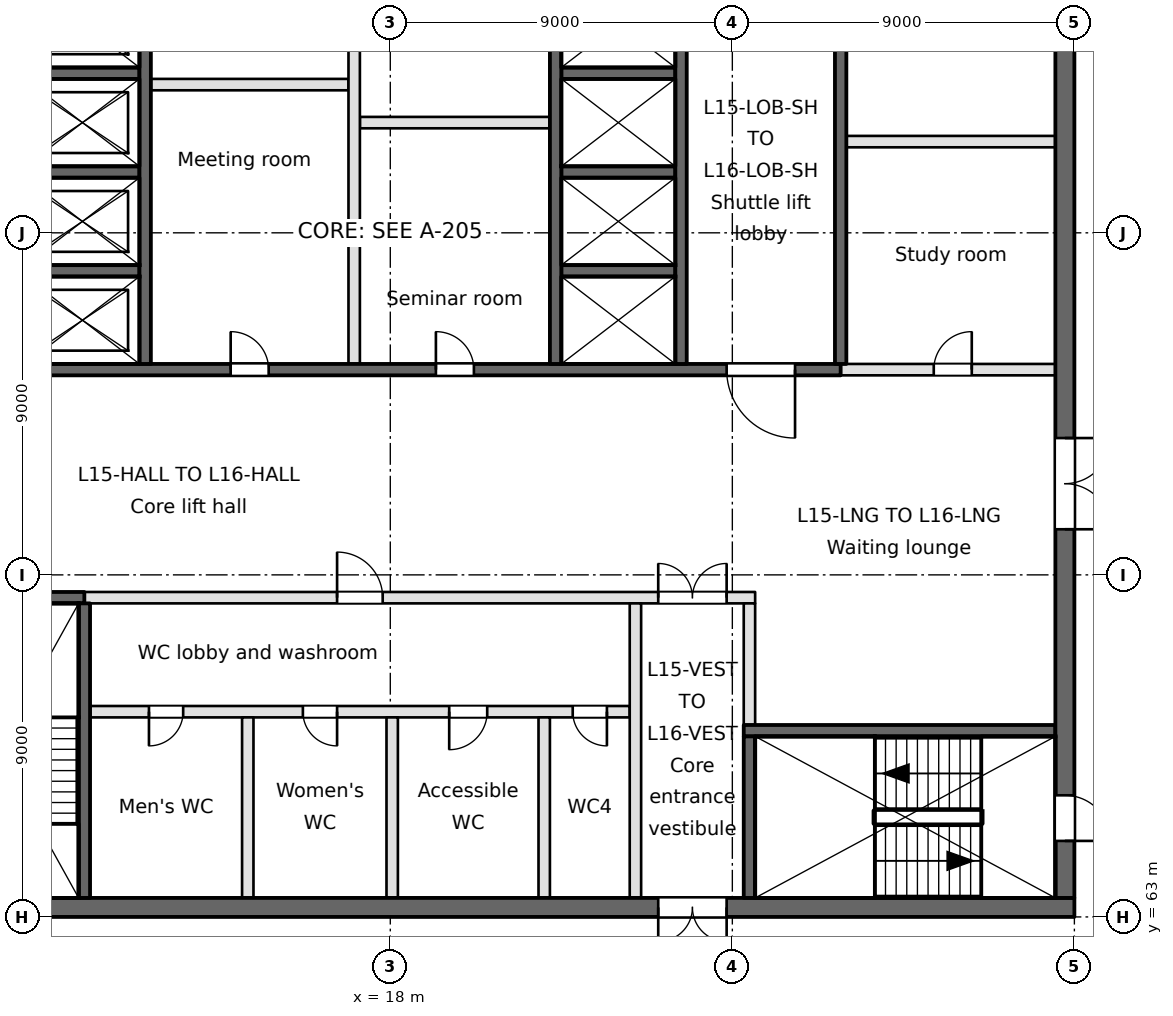
"""IFC4 building model, lengths in metres.
Left out: names, types, materials, properties, quantities, classifications, styles, units other than length and angle.
Written with IfcOpenShell. Run it as: python <this file> out.ifc"""

import sys

from ifc_helpers import new_model, si_unit, direction, frame, frame_2d, origin, place, context, subcontext, project, spatial, rectangle, extrude, element, fill, save


model = new_model("IFC4")
c1 = context("Model", 3, precision=1e-05, world=origin(), true_north=direction((0.0, 1.0)))
c2 = subcontext(c1, "Body", "Model", "MODEL_VIEW")
j1 = project(units=[si_unit("LENGTHUNIT", "METRE"), si_unit("PLANEANGLEUNIT", "RADIAN")], contexts=[c1])
p1 = place(None, origin())
s1 = spatial("IfcSite", under=j1, at=p1, CompositionType="ELEMENT")
p2 = place(p1, origin())
s2 = spatial("IfcBuilding", under=s1, at=p2, CompositionType="ELEMENT")
p3 = place(p2, frame((0.0, 0.0, 65.4)))
s3 = spatial("IfcBuildingStorey", under=s2, at=p3, CompositionType="ELEMENT", Elevation=65.4)
p4 = place(p3, frame((0.9, 63.25, -0.4), z_axis=(0.0, 0.0, 1.0), x_axis=(1.0, 0.0, 0.0)))
e1 = element("IfcWall", 1, at=p4, inside=s3, PredefinedType="SOLIDWALL", context=c2, shape_type="SweptSolid", body=[
    extrude(rectangle(XDim=35.1, YDim=0.5, at=frame_2d((17.55, 0.0))), origin(), (0.0, 0.0, 1.0), 3.7),
])
p5 = place(p4, frame((24.15, 0.0, 0.4)))
e2 = element("IfcOpeningElement", 2, at=p5, cuts=e1, PredefinedType="OPENING", context=c2, shape_type="SweptSolid", body=[
    extrude(rectangle(XDim=1.8, YDim=2.1, at=frame_2d((0.9, 1.05))), frame((0.0, 0.25, 0.0), z_axis=(0.0, -1.0, 0.0), x_axis=(1.0, 0.0, 0.0)), (0.0, 0.0, 1.0), 0.5),
])
p6 = place(p4, frame((1.55, 0.0, 0.4)))
e3 = element("IfcOpeningElement", 3, at=p6, cuts=e1, PredefinedType="OPENING", context=c2, shape_type="SweptSolid", body=[
    extrude(rectangle(XDim=1.2, YDim=2.1, at=frame_2d((0.6, 1.05))), frame((0.0, 0.25, 0.0), z_axis=(0.0, -1.0, 0.0), x_axis=(1.0, 0.0, 0.0)), (0.0, 0.0, 1.0), 0.5),
])
p7 = place(p4, frame((6.15, 0.0, 0.4)))
e4 = element("IfcOpeningElement", 4, at=p7, cuts=e1, PredefinedType="OPENING", context=c2, shape_type="SweptSolid", body=[
    extrude(rectangle(XDim=1.2, YDim=2.1, at=frame_2d((0.6, 1.05))), frame((0.0, 0.25, 0.0), z_axis=(0.0, -1.0, 0.0), x_axis=(1.0, 0.0, 0.0)), (0.0, 0.0, 1.0), 0.5),
])
p8 = place(p3, frame((27.3, 67.9, -0.4), z_axis=(0.0, 0.0, 1.0), x_axis=(1.0, 0.0, 0.0)))
e5 = element("IfcWall", 5, at=p8, inside=s3, PredefinedType="SOLIDWALL", context=c2, shape_type="SweptSolid", body=[
    extrude(rectangle(XDim=8.2, YDim=0.3, at=frame_2d((4.1, 0.0))), origin(), (0.0, 0.0, 1.0), 3.7),
])
p9 = place(p3, frame((10.1, 68.4, 0.0), z_axis=(0.0, 0.0, 1.0), x_axis=(1.0, 0.0, 0.0)))
e6 = element("IfcWall", 6, at=p9, inside=s3, PredefinedType="PARTITIONING", context=c2, shape_type="SweptSolid", body=[
    extrude(rectangle(XDim=14.2, YDim=0.3, at=frame_2d((7.1, 0.0))), origin(), (0.0, 0.0, 1.0), 3.3),
])
p10 = place(p9, frame((1.55, 0.0, 0.0)))
e7 = element("IfcOpeningElement", 7, at=p10, cuts=e6, PredefinedType="OPENING", context=c2, shape_type="SweptSolid", body=[
    extrude(rectangle(XDim=0.9, YDim=2.1, at=frame_2d((0.45, 1.05))), frame((0.0, 0.15, 0.0), z_axis=(0.0, -1.0, 0.0), x_axis=(1.0, 0.0, 0.0)), (0.0, 0.0, 1.0), 0.3),
])
p11 = place(p9, frame((5.6, 0.0, 0.0)))
e8 = element("IfcOpeningElement", 8, at=p11, cuts=e6, PredefinedType="OPENING", context=c2, shape_type="SweptSolid", body=[
    extrude(rectangle(XDim=0.9, YDim=2.1, at=frame_2d((0.45, 1.05))), frame((0.0, 0.15, 0.0), z_axis=(0.0, -1.0, 0.0), x_axis=(1.0, 0.0, 0.0)), (0.0, 0.0, 1.0), 0.3),
])
p12 = place(p9, frame((9.45, 0.0, 0.0)))
e9 = element("IfcOpeningElement", 9, at=p12, cuts=e6, PredefinedType="OPENING", context=c2, shape_type="SweptSolid", body=[
    extrude(rectangle(XDim=1.0, YDim=2.1, at=frame_2d((0.5, 1.05))), frame((0.0, 0.15, 0.0), z_axis=(0.0, -1.0, 0.0), x_axis=(1.0, 0.0, 0.0)), (0.0, 0.0, 1.0), 0.3),
])
p13 = place(p9, frame((12.7, 0.0, 0.0)))
e10 = element("IfcOpeningElement", 10, at=p13, cuts=e6, PredefinedType="OPENING", context=c2, shape_type="SweptSolid", body=[
    extrude(rectangle(XDim=0.9, YDim=2.1, at=frame_2d((0.45, 1.05))), frame((0.0, 0.15, 0.0), z_axis=(0.0, -1.0, 0.0), x_axis=(1.0, 0.0, 0.0)), (0.0, 0.0, 1.0), 0.3),
])
p14 = place(p3, frame((0.9, 71.4, -0.4), z_axis=(0.0, 0.0, 1.0), x_axis=(1.0, 0.0, 0.0)))
e11 = element("IfcWall", 11, at=p14, inside=s3, PredefinedType="SOLIDWALL", context=c2, shape_type="SweptSolid", body=[
    extrude(rectangle(XDim=9.05, YDim=0.3, at=frame_2d((4.525, 0.0))), origin(), (0.0, 0.0, 1.0), 3.7),
])
p15 = place(p3, frame((9.95, 71.4, 0.0), z_axis=(0.0, 0.0, 1.0), x_axis=(1.0, 0.0, 0.0)))
e12 = element("IfcWall", 12, at=p15, inside=s3, PredefinedType="PARTITIONING", context=c2, shape_type="SweptSolid", body=[
    extrude(rectangle(XDim=17.65, YDim=0.3, at=frame_2d((8.825, 0.0))), origin(), (0.0, 0.0, 1.0), 3.3),
])
p16 = place(p15, frame((15.1, 0.0, 0.0)))
e13 = element("IfcOpeningElement", 13, at=p16, cuts=e12, PredefinedType="OPENING", context=c2, shape_type="SweptSolid", body=[
    extrude(rectangle(XDim=1.8, YDim=2.1, at=frame_2d((0.9, 1.05))), frame((0.0, 0.15, 0.0), z_axis=(0.0, -1.0, 0.0), x_axis=(1.0, 0.0, 0.0)), (0.0, 0.0, 1.0), 0.3),
])
p17 = place(p15, frame((6.65, 0.0, 0.0)))
e14 = element("IfcOpeningElement", 14, at=p17, cuts=e12, PredefinedType="OPENING", context=c2, shape_type="SweptSolid", body=[
    extrude(rectangle(XDim=1.2, YDim=2.1, at=frame_2d((0.6, 1.05))), frame((0.0, 0.15, 0.0), z_axis=(0.0, -1.0, 0.0), x_axis=(1.0, 0.0, 0.0)), (0.0, 0.0, 1.0), 0.3),
])
p18 = place(p3, frame((0.9, 77.4, -0.4), z_axis=(0.0, 0.0, 1.0), x_axis=(1.0, 0.0, 0.0)))
e15 = element("IfcWall", 15, at=p18, inside=s3, PredefinedType="SOLIDWALL", context=c2, shape_type="SweptSolid", body=[
    extrude(rectangle(XDim=28.95, YDim=0.3, at=frame_2d((14.475, 0.0))), origin(), (0.0, 0.0, 1.0), 3.7),
])
p19 = place(p18, frame((4.35, 0.0, 0.4)))
e16 = element("IfcOpeningElement", 16, at=p19, cuts=e15, PredefinedType="OPENING", context=c2, shape_type="SweptSolid", body=[
    extrude(rectangle(XDim=1.8, YDim=2.1, at=frame_2d((0.9, 1.05))), frame((0.0, 0.15, 0.0), z_axis=(0.0, -1.0, 0.0), x_axis=(1.0, 0.0, 0.0)), (0.0, 0.0, 1.0), 0.3),
])
p20 = place(p18, frame((25.95, 0.0, 0.4)))
e17 = element("IfcOpeningElement", 17, at=p20, cuts=e15, PredefinedType="OPENING", context=c2, shape_type="SweptSolid", body=[
    extrude(rectangle(XDim=1.8, YDim=2.1, at=frame_2d((0.9, 1.05))), frame((0.0, 0.15, 0.0), z_axis=(0.0, -1.0, 0.0), x_axis=(1.0, 0.0, 0.0)), (0.0, 0.0, 1.0), 0.3),
])
p21 = place(p18, frame((12.9, 0.0, 0.4)))
e18 = element("IfcOpeningElement", 18, at=p21, cuts=e15, PredefinedType="OPENING", context=c2, shape_type="SweptSolid", body=[
    extrude(rectangle(XDim=1.0, YDim=2.1, at=frame_2d((0.5, 1.05))), frame((0.0, 0.15, 0.0), z_axis=(0.0, -1.0, 0.0), x_axis=(1.0, 0.0, 0.0)), (0.0, 0.0, 1.0), 0.3),
])
p22 = place(p18, frame((18.3, 0.0, 0.4)))
e19 = element("IfcOpeningElement", 19, at=p22, cuts=e15, PredefinedType="OPENING", context=c2, shape_type="SweptSolid", body=[
    extrude(rectangle(XDim=1.0, YDim=2.1, at=frame_2d((0.5, 1.05))), frame((0.0, 0.15, 0.0), z_axis=(0.0, -1.0, 0.0), x_axis=(1.0, 0.0, 0.0)), (0.0, 0.0, 1.0), 0.3),
])
p23 = place(p3, frame((29.85, 77.4, 0.0), z_axis=(0.0, 0.0, 1.0), x_axis=(1.0, 0.0, 0.0)))
e20 = element("IfcWall", 20, at=p23, inside=s3, PredefinedType="PARTITIONING", context=c2, shape_type="SweptSolid", body=[
    extrude(rectangle(XDim=5.65, YDim=0.3, at=frame_2d((2.825, 0.0))), origin(), (0.0, 0.0, 1.0), 3.3),
])
p24 = place(p23, frame((2.45, 0.0, 0.0)))
e21 = element("IfcOpeningElement", 21, at=p24, cuts=e20, PredefinedType="OPENING", context=c2, shape_type="SweptSolid", body=[
    extrude(rectangle(XDim=1.0, YDim=2.1, at=frame_2d((0.5, 1.05))), frame((0.0, 0.15, 0.0), z_axis=(0.0, -1.0, 0.0), x_axis=(1.0, 0.0, 0.0)), (0.0, 0.0, 1.0), 0.3),
])
for number, where, z_axis, x_axis in (
    (22, (8.4, 80.0, -0.4), (0.0, 0.0, 1.0), (1.0, 0.0, 0.0)),
    (23, (22.5, 80.0, -0.4), (0.0, 0.0, 1.0), (1.0, 0.0, 0.0)),
    (24, (8.4, 82.6, -0.4), (0.0, 0.0, 1.0), (1.0, 0.0, 0.0)),
    (25, (22.5, 82.6, -0.4), (0.0, 0.0, 1.0), (1.0, 0.0, 0.0)),
):
    element("IfcWall", number, at=place(p3, frame(where, z_axis=z_axis, x_axis=x_axis)), inside=s3, PredefinedType="SOLIDWALL", context=c2, shape_type="SweptSolid", body=[
        extrude(rectangle(XDim=3.0, YDim=0.3, at=frame_2d((1.5, 0.0))), origin(), (0.0, 0.0, 1.0), 3.7),
    ])
p25 = place(p3, frame((30.0, 83.4, 0.0), z_axis=(0.0, 0.0, 1.0), x_axis=(1.0, 0.0, 0.0)))
e26 = element("IfcWall", 26, at=p25, inside=s3, PredefinedType="PARTITIONING", context=c2, shape_type="SweptSolid", body=[
    extrude(rectangle(XDim=5.5, YDim=0.3, at=frame_2d((2.75, 0.0))), origin(), (0.0, 0.0, 1.0), 3.3),
])
p26 = place(p3, frame((17.2, 83.9, 0.0), z_axis=(0.0, 0.0, 1.0), x_axis=(1.0, 0.0, 0.0)))
e27 = element("IfcWall", 27, at=p26, inside=s3, PredefinedType="PARTITIONING", context=c2, shape_type="SweptSolid", body=[
    extrude(rectangle(XDim=5.0, YDim=0.3, at=frame_2d((2.5, 0.0))), origin(), (0.0, 0.0, 1.0), 3.3),
])
p27 = place(p3, frame((11.7, 84.9, 0.0), z_axis=(0.0, 0.0, 1.0), x_axis=(1.0, 0.0, 0.0)))
e28 = element("IfcWall", 28, at=p27, inside=s3, PredefinedType="PARTITIONING", context=c2, shape_type="SweptSolid", body=[
    extrude(rectangle(XDim=5.2, YDim=0.3, at=frame_2d((2.6, 0.0))), origin(), (0.0, 0.0, 1.0), 3.3),
])
for number, where, z_axis, x_axis in (
    (29, (8.4, 85.2, -0.4), (0.0, 0.0, 1.0), (1.0, 0.0, 0.0)),
    (30, (22.5, 85.2, -0.4), (0.0, 0.0, 1.0), (1.0, 0.0, 0.0)),
):
    element("IfcWall", number, at=place(p3, frame(where, z_axis=z_axis, x_axis=x_axis)), inside=s3, PredefinedType="SOLIDWALL", context=c2, shape_type="SweptSolid", body=[
        extrude(rectangle(XDim=3.0, YDim=0.3, at=frame_2d((1.5, 0.0))), origin(), (0.0, 0.0, 1.0), 3.7),
    ])
p28 = place(p3, frame((9.95, 63.5, -0.4), z_axis=(0.0, 0.0, 1.0), x_axis=(0.0, 1.0, 0.0)))
e31 = element("IfcWall", 31, at=p28, inside=s3, PredefinedType="SOLIDWALL", context=c2, shape_type="SweptSolid", body=[
    extrude(rectangle(XDim=7.75, YDim=0.3, at=frame_2d((3.875, 0.0))), origin(), (0.0, 0.0, 1.0), 3.7),
])
p29 = place(p3, frame((11.55, 77.55, -0.4), z_axis=(0.0, 0.0, 1.0), x_axis=(0.0, 1.0, 0.0)))
e32 = element("IfcWall", 32, at=p29, inside=s3, PredefinedType="SOLIDWALL", context=c2, shape_type="SweptSolid", body=[
    extrude(rectangle(XDim=10.1, YDim=0.3, at=frame_2d((5.05, 0.0))), origin(), (0.0, 0.0, 1.0), 3.7),
])
p30 = place(p3, frame((14.25, 63.5, 0.0), z_axis=(0.0, 0.0, 1.0), x_axis=(0.0, 1.0, 0.0)))
e33 = element("IfcWall", 33, at=p30, inside=s3, PredefinedType="PARTITIONING", context=c2, shape_type="SweptSolid", body=[
    extrude(rectangle(XDim=4.75, YDim=0.3, at=frame_2d((2.375, 0.0))), origin(), (0.0, 0.0, 1.0), 3.3),
])
p31 = place(p3, frame((17.05, 77.55, 0.0), z_axis=(0.0, 0.0, 1.0), x_axis=(0.0, 1.0, 0.0)))
e34 = element("IfcWall", 34, at=p31, inside=s3, PredefinedType="PARTITIONING", context=c2, shape_type="SweptSolid", body=[
    extrude(rectangle(XDim=12.95, YDim=0.3, at=frame_2d((6.475, 0.0))), origin(), (0.0, 0.0, 1.0), 3.3),
])
for number, where, z_axis, x_axis in (
    (35, (18.05, 63.5, 0.0), (0.0, 0.0, 1.0), (0.0, 1.0, 0.0)),
    (36, (22.05, 63.5, 0.0), (0.0, 0.0, 1.0), (0.0, 1.0, 0.0)),
):
    element("IfcWall", number, at=place(p3, frame(where, z_axis=z_axis, x_axis=x_axis)), inside=s3, PredefinedType="PARTITIONING", context=c2, shape_type="SweptSolid", body=[
        extrude(rectangle(XDim=4.75, YDim=0.3, at=frame_2d((2.375, 0.0))), origin(), (0.0, 0.0, 1.0), 3.3),
    ])
p32 = place(p3, frame((22.35, 77.55, -0.4), z_axis=(0.0, 0.0, 1.0), x_axis=(0.0, 1.0, 0.0)))
e37 = element("IfcWall", 37, at=p32, inside=s3, PredefinedType="SOLIDWALL", context=c2, shape_type="SweptSolid", body=[
    extrude(rectangle(XDim=10.1, YDim=0.3, at=frame_2d((5.05, 0.0))), origin(), (0.0, 0.0, 1.0), 3.7),
])
p33 = place(p3, frame((24.45, 63.5, 0.0), z_axis=(0.0, 0.0, 1.0), x_axis=(0.0, 1.0, 0.0)))
e38 = element("IfcWall", 38, at=p33, inside=s3, PredefinedType="PARTITIONING", context=c2, shape_type="SweptSolid", body=[
    extrude(rectangle(XDim=7.75, YDim=0.3, at=frame_2d((3.875, 0.0))), origin(), (0.0, 0.0, 1.0), 3.3),
])
p34 = place(p3, frame((25.65, 77.55, -0.4), z_axis=(0.0, 0.0, 1.0), x_axis=(0.0, 1.0, 0.0)))
e39 = element("IfcWall", 39, at=p34, inside=s3, PredefinedType="SOLIDWALL", context=c2, shape_type="SweptSolid", body=[
    extrude(rectangle(XDim=10.1, YDim=0.3, at=frame_2d((5.05, 0.0))), origin(), (0.0, 0.0, 1.0), 3.7),
])
p35 = place(p3, frame((27.45, 63.5, -0.4), z_axis=(0.0, 0.0, 1.0), x_axis=(0.0, 1.0, 0.0)))
e40 = element("IfcWall", 40, at=p35, inside=s3, PredefinedType="SOLIDWALL", context=c2, shape_type="SweptSolid", body=[
    extrude(rectangle(XDim=4.25, YDim=0.3, at=frame_2d((2.125, 0.0))), origin(), (0.0, 0.0, 1.0), 3.7),
])
p36 = place(p3, frame((27.45, 68.05, 0.0), z_axis=(0.0, 0.0, 1.0), x_axis=(0.0, 1.0, 0.0)))
e41 = element("IfcWall", 41, at=p36, inside=s3, PredefinedType="PARTITIONING", context=c2, shape_type="SweptSolid", body=[
    extrude(rectangle(XDim=3.2, YDim=0.3, at=frame_2d((1.6, 0.0))), origin(), (0.0, 0.0, 1.0), 3.3),
])
p37 = place(p3, frame((29.85, 77.55, -0.4), z_axis=(0.0, 0.0, 1.0), x_axis=(0.0, 1.0, 0.0)))
e42 = element("IfcWall", 42, at=p37, inside=s3, PredefinedType="SOLIDWALL", context=c2, shape_type="SweptSolid", body=[
    extrude(rectangle(XDim=10.1, YDim=0.3, at=frame_2d((5.05, 0.0))), origin(), (0.0, 0.0, 1.0), 3.7),
])
p38 = place(p3, frame((35.75, 63.5, -0.4), z_axis=(0.0, 0.0, 1.0), x_axis=(0.0, 1.0, 0.0)))
e43 = element("IfcWall", 43, at=p38, inside=s3, PredefinedType="SOLIDWALL", context=c2, shape_type="SweptSolid", body=[
    extrude(rectangle(XDim=34.6, YDim=0.5, at=frame_2d((17.3, 0.0))), origin(), (0.0, 0.0, 1.0), 3.7),
])
p39 = place(p38, frame((9.7, 0.0, 0.4)))
e44 = element("IfcOpeningElement", 44, at=p39, cuts=e43, PredefinedType="OPENING", context=c2, shape_type="SweptSolid", body=[
    extrude(rectangle(XDim=2.4, YDim=2.1, at=frame_2d((1.2, 1.05))), frame((0.0, 0.25, 0.0), z_axis=(0.0, -1.0, 0.0), x_axis=(1.0, 0.0, 0.0)), (0.0, 0.0, 1.0), 0.5),
])
p40 = place(p38, frame((27.9, 0.0, 0.4)))
e45 = element("IfcOpeningElement", 45, at=p40, cuts=e43, PredefinedType="OPENING", context=c2, shape_type="SweptSolid", body=[
    extrude(rectangle(XDim=1.5, YDim=2.1, at=frame_2d((0.75, 1.05))), frame((0.0, 0.25, 0.0), z_axis=(0.0, -1.0, 0.0), x_axis=(1.0, 0.0, 0.0)), (0.0, 0.0, 1.0), 0.5),
])
p41 = place(p38, frame((1.5, 0.0, 0.4)))
e46 = element("IfcOpeningElement", 46, at=p41, cuts=e43, PredefinedType="OPENING", context=c2, shape_type="SweptSolid", body=[
    extrude(rectangle(XDim=1.2, YDim=2.1, at=frame_2d((0.6, 1.05))), frame((0.0, 0.25, 0.0), z_axis=(0.0, -1.0, 0.0), x_axis=(1.0, 0.0, 0.0)), (0.0, 0.0, 1.0), 0.5),
])
p42 = place(p20, frame((1.8, 0.0, 0.0), z_axis=(0.0, 0.0, 1.0), x_axis=(-1.0, 0.0, 0.0)))
e47 = element("IfcDoor", 47, at=p42, inside=s3, OperationType="SINGLE_SWING_LEFT", PredefinedType="DOOR", context=c2, shape_type="SweptSolid", body=[
    extrude(rectangle(XDim=1.8, YDim=2.1, at=frame_2d((0.9, 1.05))), frame((0.0, 0.025, 0.0), z_axis=(0.0, -1.0, 0.0), x_axis=(1.0, 0.0, 0.0)), (0.0, 0.0, 1.0), 0.05),
])
fill(e17, e47)
p43 = place(p39, frame((2.4, 0.0, 0.0), z_axis=(0.0, 0.0, 1.0), x_axis=(-1.0, 0.0, 0.0)))
e48 = element("IfcDoor", 48, at=p43, inside=s3, OperationType="DOUBLE_DOOR_SINGLE_SWING", PredefinedType="DOOR", context=c2, shape_type="SweptSolid", body=[
    extrude(rectangle(XDim=2.4, YDim=2.1, at=frame_2d((1.2, 1.05))), frame((0.0, 0.025, 0.0), z_axis=(0.0, -1.0, 0.0), x_axis=(1.0, 0.0, 0.0)), (0.0, 0.0, 1.0), 0.05),
])
fill(e44, e48)
p44 = place(p5, frame((1.8, 0.0, 0.0), z_axis=(0.0, 0.0, 1.0), x_axis=(-1.0, 0.0, 0.0)))
e49 = element("IfcDoor", 49, at=p44, inside=s3, OperationType="DOUBLE_DOOR_SINGLE_SWING", PredefinedType="DOOR", context=c2, shape_type="SweptSolid", body=[
    extrude(rectangle(XDim=1.8, YDim=2.1, at=frame_2d((0.9, 1.05))), frame((0.0, 0.025, 0.0), z_axis=(0.0, -1.0, 0.0), x_axis=(1.0, 0.0, 0.0)), (0.0, 0.0, 1.0), 0.05),
])
fill(e2, e49)
p45 = place(p16, origin())
e50 = element("IfcDoor", 50, at=p45, inside=s3, OperationType="DOUBLE_DOOR_SINGLE_SWING", PredefinedType="DOOR", context=c2, shape_type="SweptSolid", body=[
    extrude(rectangle(XDim=1.8, YDim=2.1, at=frame_2d((0.9, 1.05))), frame((0.0, 0.025, 0.0), z_axis=(0.0, -1.0, 0.0), x_axis=(1.0, 0.0, 0.0)), (0.0, 0.0, 1.0), 0.05),
])
fill(e13, e50)
p46 = place(p10, frame((0.9, 0.0, 0.0), z_axis=(0.0, 0.0, 1.0), x_axis=(-1.0, 0.0, 0.0)))
e51 = element("IfcDoor", 51, at=p46, inside=s3, OperationType="SINGLE_SWING_RIGHT", PredefinedType="DOOR", context=c2, shape_type="SweptSolid", body=[
    extrude(rectangle(XDim=0.9, YDim=2.1, at=frame_2d((0.45, 1.05))), frame((0.0, 0.025, 0.0), z_axis=(0.0, -1.0, 0.0), x_axis=(1.0, 0.0, 0.0)), (0.0, 0.0, 1.0), 0.05),
])
fill(e7, e51)
p47 = place(p11, frame((0.9, 0.0, 0.0), z_axis=(0.0, 0.0, 1.0), x_axis=(-1.0, 0.0, 0.0)))
e52 = element("IfcDoor", 52, at=p47, inside=s3, OperationType="SINGLE_SWING_LEFT", PredefinedType="DOOR", context=c2, shape_type="SweptSolid", body=[
    extrude(rectangle(XDim=0.9, YDim=2.1, at=frame_2d((0.45, 1.05))), frame((0.0, 0.025, 0.0), z_axis=(0.0, -1.0, 0.0), x_axis=(1.0, 0.0, 0.0)), (0.0, 0.0, 1.0), 0.05),
])
fill(e8, e52)
p48 = place(p12, frame((1.0, 0.0, 0.0), z_axis=(0.0, 0.0, 1.0), x_axis=(-1.0, 0.0, 0.0)))
e53 = element("IfcDoor", 53, at=p48, inside=s3, OperationType="SINGLE_SWING_RIGHT", PredefinedType="DOOR", context=c2, shape_type="SweptSolid", body=[
    extrude(rectangle(XDim=1.0, YDim=2.1, at=frame_2d((0.5, 1.05))), frame((0.0, 0.025, 0.0), z_axis=(0.0, -1.0, 0.0), x_axis=(1.0, 0.0, 0.0)), (0.0, 0.0, 1.0), 0.05),
])
fill(e9, e53)
p49 = place(p13, frame((0.9, 0.0, 0.0), z_axis=(0.0, 0.0, 1.0), x_axis=(-1.0, 0.0, 0.0)))
e54 = element("IfcDoor", 54, at=p49, inside=s3, OperationType="SINGLE_SWING_LEFT", PredefinedType="DOOR", context=c2, shape_type="SweptSolid", body=[
    extrude(rectangle(XDim=0.9, YDim=2.1, at=frame_2d((0.45, 1.05))), frame((0.0, 0.025, 0.0), z_axis=(0.0, -1.0, 0.0), x_axis=(1.0, 0.0, 0.0)), (0.0, 0.0, 1.0), 0.05),
])
fill(e10, e54)
p50 = place(p17, origin())
e55 = element("IfcDoor", 55, at=p50, inside=s3, OperationType="SINGLE_SWING_LEFT", PredefinedType="DOOR", context=c2, shape_type="SweptSolid", body=[
    extrude(rectangle(XDim=1.2, YDim=2.1, at=frame_2d((0.6, 1.05))), frame((0.0, 0.025, 0.0), z_axis=(0.0, -1.0, 0.0), x_axis=(1.0, 0.0, 0.0)), (0.0, 0.0, 1.0), 0.05),
])
fill(e14, e55)
p51 = place(p41, frame((1.2, 0.0, 0.0), z_axis=(0.0, 0.0, 1.0), x_axis=(-1.0, 0.0, 0.0)))
e56 = element("IfcDoor", 56, at=p51, inside=s3, OperationType="SINGLE_SWING_RIGHT", PredefinedType="DOOR", context=c2, shape_type="SweptSolid", body=[
    extrude(rectangle(XDim=1.2, YDim=2.1, at=frame_2d((0.6, 1.05))), frame((0.0, 0.025, 0.0), z_axis=(0.0, -1.0, 0.0), x_axis=(1.0, 0.0, 0.0)), (0.0, 0.0, 1.0), 0.05),
])
fill(e46, e56)
p52 = place(p21, origin())
e57 = element("IfcDoor", 57, at=p52, inside=s3, OperationType="SINGLE_SWING_LEFT", PredefinedType="DOOR", context=c2, shape_type="SweptSolid", body=[
    extrude(rectangle(XDim=1.0, YDim=2.1, at=frame_2d((0.5, 1.05))), frame((0.0, 0.025, 0.0), z_axis=(0.0, -1.0, 0.0), x_axis=(1.0, 0.0, 0.0)), (0.0, 0.0, 1.0), 0.05),
])
fill(e18, e57)
p53 = place(p22, origin())
e58 = element("IfcDoor", 58, at=p53, inside=s3, OperationType="SINGLE_SWING_LEFT", PredefinedType="DOOR", context=c2, shape_type="SweptSolid", body=[
    extrude(rectangle(XDim=1.0, YDim=2.1, at=frame_2d((0.5, 1.05))), frame((0.0, 0.025, 0.0), z_axis=(0.0, -1.0, 0.0), x_axis=(1.0, 0.0, 0.0)), (0.0, 0.0, 1.0), 0.05),
])
fill(e19, e58)
p54 = place(p24, origin())
e59 = element("IfcDoor", 59, at=p54, inside=s3, OperationType="SINGLE_SWING_RIGHT", PredefinedType="DOOR", context=c2, shape_type="SweptSolid", body=[
    extrude(rectangle(XDim=1.0, YDim=2.1, at=frame_2d((0.5, 1.05))), frame((0.0, 0.025, 0.0), z_axis=(0.0, -1.0, 0.0), x_axis=(1.0, 0.0, 0.0)), (0.0, 0.0, 1.0), 0.05),
])
fill(e21, e59)
save(model, sys.argv[1])
